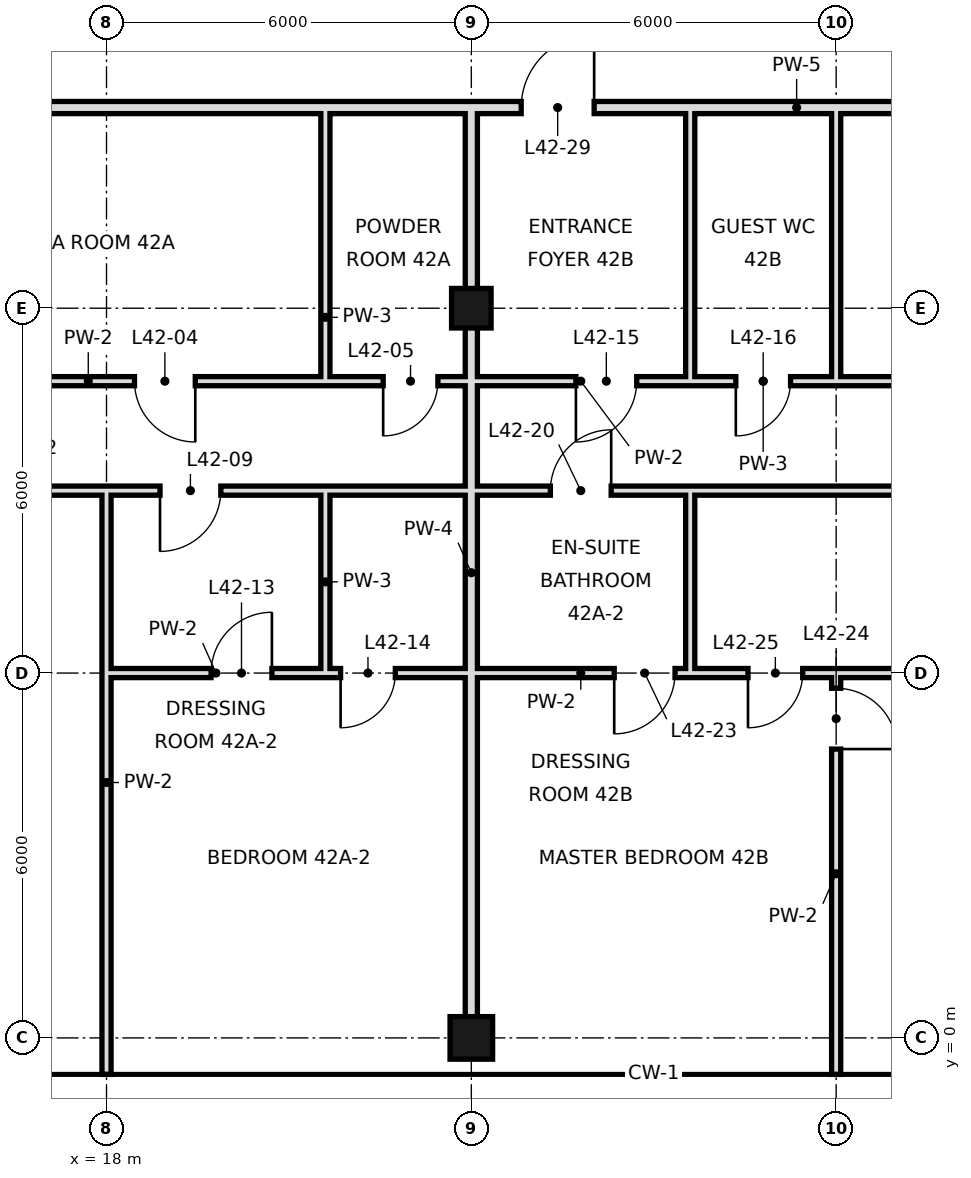
"""IFC4 building model, lengths in metres.
Left out: names, types, materials, properties, quantities, classifications, styles, units other than length and angle.
Written with IfcOpenShell. Run it as: python <this file> out.ifc"""

import sys

from ifc_helpers import new_model, si_unit, direction, frame, frame_2d, origin, origin_2d, place, context, subcontext, project, spatial, rectangle, hollow_rectangle, extrude, element, fill, save


model = new_model("IFC4")
c1 = context("Model", 3, precision=1e-05, world=origin(), true_north=direction((0.0, 1.0)))
c2 = subcontext(c1, "Body", "Model", "MODEL_VIEW")
j1 = project(units=[si_unit("LENGTHUNIT", "METRE"), si_unit("PLANEANGLEUNIT", "RADIAN")], contexts=[c1])
p1 = place(None, origin())
s1 = spatial("IfcSite", under=j1, at=p1, CompositionType="ELEMENT")
p2 = place(p1, origin())
s2 = spatial("IfcBuilding", under=s1, at=p2, CompositionType="ELEMENT")
p3 = place(p2, frame((0.0, 0.0, 181.6)))
s3 = spatial("IfcBuildingStorey", under=s2, at=p3, CompositionType="ELEMENT", Elevation=181.6)
p4 = place(p3, frame((24.0, 0.0, 0.0), z_axis=(0.0, 0.0, 1.0), x_axis=(1.0, 0.0, 0.0)))
e1 = element("IfcColumn", 1, at=p4, inside=s3, PredefinedType="COLUMN", context=c2, shape_type="SweptSolid", body=[
    extrude(hollow_rectangle(XDim=0.7, YDim=0.7, WallThickness=0.036, at=origin_2d()), origin(), (0.0, 0.0, 1.0), 4.4),
])
p5 = place(p3, frame((24.0, 12.0, 0.0), z_axis=(0.0, 0.0, 1.0), x_axis=(1.0, 0.0, 0.0)))
e2 = element("IfcColumn", 2, at=p5, inside=s3, PredefinedType="COLUMN", context=c2, shape_type="SweptSolid", body=[
    extrude(hollow_rectangle(XDim=0.65, YDim=0.65, WallThickness=0.032, at=origin_2d()), origin(), (0.0, 0.0, 1.0), 4.4),
])
p6 = place(p3, frame((18.0, -0.6, 0.0), z_axis=(0.0, 0.0, 1.0), x_axis=(0.0, 1.0, 0.0)))
e3 = element("IfcWall", 3, at=p6, inside=s3, PredefinedType="PARTITIONING", context=c2, shape_type="SweptSolid", body=[
    extrude(rectangle(XDim=9.6, YDim=0.15, at=frame_2d((4.8, 0.0))), origin(), (0.0, 0.0, 1.0), 3.4),
])
p7 = place(p3, frame((21.6, 6.0, 0.0), z_axis=(0.0, 0.0, 1.0), x_axis=(0.0, 1.0, 0.0)))
e4 = element("IfcWall", 4, at=p7, inside=s3, PredefinedType="PARTITIONING", context=c2, shape_type="SweptSolid", body=[
    extrude(rectangle(XDim=3.0, YDim=0.15, at=frame_2d((1.5, 0.0))), origin(), (0.0, 0.0, 1.0), 4.1),
])
p8 = place(p3, frame((21.6, 10.8, 0.0), z_axis=(0.0, 0.0, 1.0), x_axis=(0.0, 1.0, 0.0)))
e5 = element("IfcWall", 5, at=p8, inside=s3, PredefinedType="PARTITIONING", context=c2, shape_type="SweptSolid", body=[
    extrude(rectangle(XDim=4.5, YDim=0.15, at=frame_2d((2.25, 0.0))), origin(), (0.0, 0.0, 1.0), 4.1),
])
p9 = place(p3, frame((24.0, 0.0, 0.0), z_axis=(0.0, 0.0, 1.0), x_axis=(0.0, 1.0, 0.0)))
e6 = element("IfcWall", 6, at=p9, inside=s3, PredefinedType="SOLIDWALL", context=c2, shape_type="SweptSolid", body=[
    extrude(rectangle(XDim=15.3, YDim=0.2, at=frame_2d((7.65, 0.0))), origin(), (0.0, 0.0, 1.0), 3.4),
])
p10 = place(p3, frame((27.6, 6.0, 0.0), z_axis=(0.0, 0.0, 1.0), x_axis=(0.0, 1.0, 0.0)))
e7 = element("IfcWall", 7, at=p10, inside=s3, PredefinedType="PARTITIONING", context=c2, shape_type="SweptSolid", body=[
    extrude(rectangle(XDim=3.0, YDim=0.15, at=frame_2d((1.5, 0.0))), origin(), (0.0, 0.0, 1.0), 4.1),
])
p11 = place(p3, frame((27.6, 10.8, 0.0), z_axis=(0.0, 0.0, 1.0), x_axis=(0.0, 1.0, 0.0)))
e8 = element("IfcWall", 8, at=p11, inside=s3, PredefinedType="PARTITIONING", context=c2, shape_type="SweptSolid", body=[
    extrude(rectangle(XDim=4.5, YDim=0.15, at=frame_2d((2.25, 0.0))), origin(), (0.0, 0.0, 1.0), 4.1),
])
p12 = place(p3, frame((30.0, -0.6, 0.0), z_axis=(0.0, 0.0, 1.0), x_axis=(0.0, 1.0, 0.0)))
e9 = element("IfcWall", 9, at=p12, inside=s3, PredefinedType="PARTITIONING", context=c2, shape_type="SweptSolid", body=[
    extrude(rectangle(XDim=6.6, YDim=0.15, at=frame_2d((3.3, 0.0))), origin(), (0.0, 0.0, 1.0), 3.4),
])
p13 = place(p12, frame((5.35, 0.0, 0.0)))
e10 = element("IfcOpeningElement", 10, at=p13, cuts=e9, PredefinedType="OPENING", context=c2, shape_type="SweptSolid", body=[
    extrude(rectangle(XDim=1.0, YDim=2.4, at=frame_2d((0.5, 1.2))), frame((0.0, 0.085, 0.0), z_axis=(0.0, -1.0, 0.0), x_axis=(1.0, 0.0, 0.0)), (0.0, 0.0, 1.0), 0.17),
])
p14 = place(p3, frame((30.0, 10.8, 0.0), z_axis=(0.0, 0.0, 1.0), x_axis=(0.0, 1.0, 0.0)))
e11 = element("IfcWall", 11, at=p14, inside=s3, PredefinedType="PARTITIONING", context=c2, shape_type="SweptSolid", body=[
    extrude(rectangle(XDim=4.5, YDim=0.15, at=frame_2d((2.25, 0.0))), origin(), (0.0, 0.0, 1.0), 3.4),
])
p15 = place(p3, frame((13.8, 10.8, 0.0), z_axis=(0.0, 0.0, 1.0), x_axis=(1.0, 0.0, 0.0)))
e12 = element("IfcWall", 12, at=p15, inside=s3, PredefinedType="PARTITIONING", context=c2, shape_type="SweptSolid", body=[
    extrude(rectangle(XDim=7.8, YDim=0.15, at=frame_2d((3.9, 0.0))), origin(), (0.0, 0.0, 1.0), 4.1),
])
p16 = place(p15, frame((4.66, 0.0, 0.0)))
e13 = element("IfcOpeningElement", 13, at=p16, cuts=e12, PredefinedType="OPENING", context=c2, shape_type="SweptSolid", body=[
    extrude(rectangle(XDim=1.0, YDim=2.4, at=frame_2d((0.5, 1.2))), frame((0.0, 0.085, 0.0), z_axis=(0.0, -1.0, 0.0), x_axis=(1.0, 0.0, 0.0)), (0.0, 0.0, 1.0), 0.17),
])
p17 = place(p3, frame((24.0, 10.8, 0.0), z_axis=(0.0, 0.0, 1.0), x_axis=(1.0, 0.0, 0.0)))
e14 = element("IfcWall", 14, at=p17, inside=s3, PredefinedType="PARTITIONING", context=c2, shape_type="SweptSolid", body=[
    extrude(rectangle(XDim=3.6, YDim=0.15, at=frame_2d((1.8, 0.0))), origin(), (0.0, 0.0, 1.0), 4.1),
])
p18 = place(p17, frame((1.72, 0.0, 0.0)))
e15 = element("IfcOpeningElement", 15, at=p18, cuts=e14, PredefinedType="OPENING", context=c2, shape_type="SweptSolid", body=[
    extrude(rectangle(XDim=1.0, YDim=2.4, at=frame_2d((0.5, 1.2))), frame((0.0, 0.085, 0.0), z_axis=(0.0, -1.0, 0.0), x_axis=(1.0, 0.0, 0.0)), (0.0, 0.0, 1.0), 0.17),
])
p19 = place(p3, frame((30.0, 10.8, 0.0), z_axis=(0.0, 0.0, 1.0), x_axis=(1.0, 0.0, 0.0)))
e16 = element("IfcWall", 16, at=p19, inside=s3, PredefinedType="PARTITIONING", context=c2, shape_type="SweptSolid", body=[
    extrude(rectangle(XDim=24.0, YDim=0.15, at=frame_2d((12.0, 0.0))), origin(), (0.0, 0.0, 1.0), 4.1),
])
p20 = place(p19, frame((3.4, 0.0, 0.0)))
e17 = element("IfcOpeningElement", 17, at=p20, cuts=e16, PredefinedType="OPENING", context=c2, shape_type="SweptSolid", body=[
    extrude(rectangle(XDim=1.0, YDim=2.4, at=frame_2d((0.5, 1.2))), frame((0.0, 0.085, 0.0), z_axis=(0.0, -1.0, 0.0), x_axis=(1.0, 0.0, 0.0)), (0.0, 0.0, 1.0), 0.17),
])
p21 = place(p19, frame((15.4, 0.0, 0.0)))
e18 = element("IfcOpeningElement", 18, at=p21, cuts=e16, PredefinedType="OPENING", context=c2, shape_type="SweptSolid", body=[
    extrude(rectangle(XDim=1.0, YDim=2.4, at=frame_2d((0.5, 1.2))), frame((0.0, 0.085, 0.0), z_axis=(0.0, -1.0, 0.0), x_axis=(1.0, 0.0, 0.0)), (0.0, 0.0, 1.0), 0.17),
])
p22 = place(p3, frame((21.6, 10.8, 0.0), z_axis=(0.0, 0.0, 1.0), x_axis=(1.0, 0.0, 0.0)))
e19 = element("IfcWall", 19, at=p22, inside=s3, PredefinedType="PARTITIONING", context=c2, shape_type="SweptSolid", body=[
    extrude(rectangle(XDim=2.4, YDim=0.15, at=frame_2d((1.2, 0.0))), origin(), (0.0, 0.0, 1.0), 4.1),
])
p23 = place(p22, frame((0.95, 0.0, 0.0)))
e20 = element("IfcOpeningElement", 20, at=p23, cuts=e19, PredefinedType="OPENING", context=c2, shape_type="SweptSolid", body=[
    extrude(rectangle(XDim=0.9, YDim=2.4, at=frame_2d((0.45, 1.2))), frame((0.0, 0.085, 0.0), z_axis=(0.0, -1.0, 0.0), x_axis=(1.0, 0.0, 0.0)), (0.0, 0.0, 1.0), 0.17),
])
p24 = place(p3, frame((27.6, 10.8, 0.0), z_axis=(0.0, 0.0, 1.0), x_axis=(1.0, 0.0, 0.0)))
e21 = element("IfcWall", 21, at=p24, inside=s3, PredefinedType="PARTITIONING", context=c2, shape_type="SweptSolid", body=[
    extrude(rectangle(XDim=2.4, YDim=0.15, at=frame_2d((1.2, 0.0))), origin(), (0.0, 0.0, 1.0), 4.1),
])
p25 = place(p24, frame((0.75, 0.0, 0.0)))
e22 = element("IfcOpeningElement", 22, at=p25, cuts=e21, PredefinedType="OPENING", context=c2, shape_type="SweptSolid", body=[
    extrude(rectangle(XDim=0.9, YDim=2.4, at=frame_2d((0.45, 1.2))), frame((0.0, 0.085, 0.0), z_axis=(0.0, -1.0, 0.0), x_axis=(1.0, 0.0, 0.0)), (0.0, 0.0, 1.0), 0.17),
])
p26 = place(p3, frame((13.8, 15.3, 0.0), z_axis=(0.0, 0.0, 1.0), x_axis=(1.0, 0.0, 0.0)))
e23 = element("IfcWall", 23, at=p26, inside=s3, PredefinedType="SOLIDWALL", context=c2, shape_type="SweptSolid", body=[
    extrude(rectangle(XDim=31.1, YDim=0.2, at=frame_2d((15.55, 0.0))), origin(), (0.0, 0.0, 1.0), 3.4),
])
p27 = place(p26, frame((11.02, 0.0, 0.0)))
e24 = element("IfcOpeningElement", 24, at=p27, cuts=e23, PredefinedType="OPENING", context=c2, shape_type="SweptSolid", body=[
    extrude(rectangle(XDim=1.2, YDim=2.4, at=frame_2d((0.6, 1.2))), frame((0.0, 0.11, 0.0), z_axis=(0.0, -1.0, 0.0), x_axis=(1.0, 0.0, 0.0)), (0.0, 0.0, 1.0), 0.22),
])
p28 = place(p3, frame((18.0, 6.0, 0.0), z_axis=(0.0, 0.0, 1.0), x_axis=(1.0, 0.0, 0.0)))
e25 = element("IfcWall", 25, at=p28, inside=s3, PredefinedType="PARTITIONING", context=c2, shape_type="SweptSolid", body=[
    extrude(rectangle(XDim=3.6, YDim=0.15, at=frame_2d((1.8, 0.0))), origin(), (0.0, 0.0, 1.0), 3.65),
])
p29 = place(p28, frame((1.72, 0.0, 0.0)))
e26 = element("IfcOpeningElement", 26, at=p29, cuts=e25, PredefinedType="OPENING", context=c2, shape_type="SweptSolid", body=[
    extrude(rectangle(XDim=1.0, YDim=2.4, at=frame_2d((0.5, 1.2))), frame((0.0, 0.085, 0.0), z_axis=(0.0, -1.0, 0.0), x_axis=(1.0, 0.0, 0.0)), (0.0, 0.0, 1.0), 0.17),
])
p30 = place(p3, frame((24.0, 6.0, 0.0), z_axis=(0.0, 0.0, 1.0), x_axis=(1.0, 0.0, 0.0)))
e27 = element("IfcWall", 27, at=p30, inside=s3, PredefinedType="PARTITIONING", context=c2, shape_type="SweptSolid", body=[
    extrude(rectangle(XDim=3.6, YDim=0.15, at=frame_2d((1.8, 0.0))), origin(), (0.0, 0.0, 1.0), 3.65),
])
p31 = place(p30, frame((2.35, 0.0, 0.0)))
e28 = element("IfcOpeningElement", 28, at=p31, cuts=e27, PredefinedType="OPENING", context=c2, shape_type="SweptSolid", body=[
    extrude(rectangle(XDim=1.0, YDim=2.4, at=frame_2d((0.5, 1.2))), frame((0.0, 0.085, 0.0), z_axis=(0.0, -1.0, 0.0), x_axis=(1.0, 0.0, 0.0)), (0.0, 0.0, 1.0), 0.17),
])
p32 = place(p3, frame((21.6, 6.0, 0.0), z_axis=(0.0, 0.0, 1.0), x_axis=(1.0, 0.0, 0.0)))
e29 = element("IfcWall", 29, at=p32, inside=s3, PredefinedType="PARTITIONING", context=c2, shape_type="SweptSolid", body=[
    extrude(rectangle(XDim=2.4, YDim=0.15, at=frame_2d((1.2, 0.0))), origin(), (0.0, 0.0, 1.0), 3.65),
])
p33 = place(p32, frame((0.25, 0.0, 0.0)))
e30 = element("IfcOpeningElement", 30, at=p33, cuts=e29, PredefinedType="OPENING", context=c2, shape_type="SweptSolid", body=[
    extrude(rectangle(XDim=0.9, YDim=2.4, at=frame_2d((0.45, 1.2))), frame((0.0, 0.085, 0.0), z_axis=(0.0, -1.0, 0.0), x_axis=(1.0, 0.0, 0.0)), (0.0, 0.0, 1.0), 0.17),
])
p34 = place(p3, frame((27.6, 6.0, 0.0), z_axis=(0.0, 0.0, 1.0), x_axis=(1.0, 0.0, 0.0)))
e31 = element("IfcWall", 31, at=p34, inside=s3, PredefinedType="PARTITIONING", context=c2, shape_type="SweptSolid", body=[
    extrude(rectangle(XDim=8.4, YDim=0.15, at=frame_2d((4.2, 0.0))), origin(), (0.0, 0.0, 1.0), 3.65),
])
p35 = place(p34, frame((0.95, 0.0, 0.0)))
e32 = element("IfcOpeningElement", 32, at=p35, cuts=e31, PredefinedType="OPENING", context=c2, shape_type="SweptSolid", body=[
    extrude(rectangle(XDim=0.9, YDim=2.4, at=frame_2d((0.45, 1.2))), frame((0.0, 0.085, 0.0), z_axis=(0.0, -1.0, 0.0), x_axis=(1.0, 0.0, 0.0)), (0.0, 0.0, 1.0), 0.17),
])
p36 = place(p3, frame((12.0, 9.0, 0.0), z_axis=(0.0, 0.0, 1.0), x_axis=(1.0, 0.0, 0.0)))
e33 = element("IfcWall", 33, at=p36, inside=s3, PredefinedType="PARTITIONING", context=c2, shape_type="SweptSolid", body=[
    extrude(rectangle(XDim=9.6, YDim=0.15, at=frame_2d((4.8, 0.0))), origin(), (0.0, 0.0, 1.0), 4.1),
])
p37 = place(p36, frame((2.1, 0.0, 0.0)))
e34 = element("IfcOpeningElement", 34, at=p37, cuts=e33, PredefinedType="OPENING", context=c2, shape_type="SweptSolid", body=[
    extrude(rectangle(XDim=1.8, YDim=2.4, at=frame_2d((0.9, 1.2))), frame((0.0, 0.085, 0.0), z_axis=(0.0, -1.0, 0.0), x_axis=(1.0, 0.0, 0.0)), (0.0, 0.0, 1.0), 0.17),
])
p38 = place(p36, frame((6.88, 0.0, 0.0)))
e35 = element("IfcOpeningElement", 35, at=p38, cuts=e33, PredefinedType="OPENING", context=c2, shape_type="SweptSolid", body=[
    extrude(rectangle(XDim=1.0, YDim=2.4, at=frame_2d((0.5, 1.2))), frame((0.0, 0.085, 0.0), z_axis=(0.0, -1.0, 0.0), x_axis=(1.0, 0.0, 0.0)), (0.0, 0.0, 1.0), 0.17),
])
p39 = place(p3, frame((24.0, 9.0, 0.0), z_axis=(0.0, 0.0, 1.0), x_axis=(1.0, 0.0, 0.0)))
e36 = element("IfcWall", 36, at=p39, inside=s3, PredefinedType="PARTITIONING", context=c2, shape_type="SweptSolid", body=[
    extrude(rectangle(XDim=3.6, YDim=0.15, at=frame_2d((1.8, 0.0))), origin(), (0.0, 0.0, 1.0), 4.1),
])
p40 = place(p39, frame((1.3, 0.0, 0.0)))
e37 = element("IfcOpeningElement", 37, at=p40, cuts=e36, PredefinedType="OPENING", context=c2, shape_type="SweptSolid", body=[
    extrude(rectangle(XDim=1.0, YDim=2.4, at=frame_2d((0.5, 1.2))), frame((0.0, 0.085, 0.0), z_axis=(0.0, -1.0, 0.0), x_axis=(1.0, 0.0, 0.0)), (0.0, 0.0, 1.0), 0.17),
])
p41 = place(p3, frame((21.6, 9.0, 0.0), z_axis=(0.0, 0.0, 1.0), x_axis=(1.0, 0.0, 0.0)))
e38 = element("IfcWall", 38, at=p41, inside=s3, PredefinedType="PARTITIONING", context=c2, shape_type="SweptSolid", body=[
    extrude(rectangle(XDim=2.4, YDim=0.15, at=frame_2d((1.2, 0.0))), origin(), (0.0, 0.0, 1.0), 4.1),
])
p42 = place(p3, frame((27.6, 9.0, 0.0), z_axis=(0.0, 0.0, 1.0), x_axis=(1.0, 0.0, 0.0)))
e39 = element("IfcWall", 39, at=p42, inside=s3, PredefinedType="PARTITIONING", context=c2, shape_type="SweptSolid", body=[
    extrude(rectangle(XDim=8.4, YDim=0.15, at=frame_2d((4.2, 0.0))), origin(), (0.0, 0.0, 1.0), 4.1),
])
p43 = place(p16, origin())
e40 = element("IfcDoor", 40, at=p43, inside=s3, OperationType="SINGLE_SWING_RIGHT", PredefinedType="DOOR", context=c2, shape_type="SweptSolid", body=[
    extrude(rectangle(XDim=1.0, YDim=2.4, at=frame_2d((0.5, 1.2))), frame((0.0, 0.025, 0.0), z_axis=(0.0, -1.0, 0.0), x_axis=(1.0, 0.0, 0.0)), (0.0, 0.0, 1.0), 0.05),
])
fill(e13, e40)
p44 = place(p23, frame((0.9, 0.0, 0.0), z_axis=(0.0, 0.0, 1.0), x_axis=(-1.0, 0.0, 0.0)))
e41 = element("IfcDoor", 41, at=p44, inside=s3, OperationType="SINGLE_SWING_RIGHT", PredefinedType="DOOR", context=c2, shape_type="SweptSolid", body=[
    extrude(rectangle(XDim=0.9, YDim=2.4, at=frame_2d((0.45, 1.2))), frame((0.0, 0.025, 0.0), z_axis=(0.0, -1.0, 0.0), x_axis=(1.0, 0.0, 0.0)), (0.0, 0.0, 1.0), 0.05),
])
fill(e20, e41)
p45 = place(p38, frame((1.0, 0.0, 0.0), z_axis=(0.0, 0.0, 1.0), x_axis=(-1.0, 0.0, 0.0)))
e42 = element("IfcDoor", 42, at=p45, inside=s3, OperationType="SINGLE_SWING_RIGHT", PredefinedType="DOOR", context=c2, shape_type="SweptSolid", body=[
    extrude(rectangle(XDim=1.0, YDim=2.4, at=frame_2d((0.5, 1.2))), frame((0.0, 0.025, 0.0), z_axis=(0.0, -1.0, 0.0), x_axis=(1.0, 0.0, 0.0)), (0.0, 0.0, 1.0), 0.05),
])
fill(e35, e42)
p46 = place(p29, frame((1.0, 0.0, 0.0), z_axis=(0.0, 0.0, 1.0), x_axis=(-1.0, 0.0, 0.0)))
e43 = element("IfcDoor", 43, at=p46, inside=s3, OperationType="SINGLE_SWING_LEFT", PredefinedType="DOOR", context=c2, shape_type="SweptSolid", body=[
    extrude(rectangle(XDim=1.0, YDim=2.4, at=frame_2d((0.5, 1.2))), frame((0.0, 0.025, 0.0), z_axis=(0.0, -1.0, 0.0), x_axis=(1.0, 0.0, 0.0)), (0.0, 0.0, 1.0), 0.05),
])
fill(e26, e43)
p47 = place(p33, frame((0.9, 0.0, 0.0), z_axis=(0.0, 0.0, 1.0), x_axis=(-1.0, 0.0, 0.0)))
e44 = element("IfcDoor", 44, at=p47, inside=s3, OperationType="SINGLE_SWING_RIGHT", PredefinedType="DOOR", context=c2, shape_type="SweptSolid", body=[
    extrude(rectangle(XDim=0.9, YDim=2.4, at=frame_2d((0.45, 1.2))), frame((0.0, 0.025, 0.0), z_axis=(0.0, -1.0, 0.0), x_axis=(1.0, 0.0, 0.0)), (0.0, 0.0, 1.0), 0.05),
])
fill(e30, e44)
p48 = place(p18, frame((1.0, 0.0, 0.0), z_axis=(0.0, 0.0, 1.0), x_axis=(-1.0, 0.0, 0.0)))
e45 = element("IfcDoor", 45, at=p48, inside=s3, OperationType="SINGLE_SWING_RIGHT", PredefinedType="DOOR", context=c2, shape_type="SweptSolid", body=[
    extrude(rectangle(XDim=1.0, YDim=2.4, at=frame_2d((0.5, 1.2))), frame((0.0, 0.025, 0.0), z_axis=(0.0, -1.0, 0.0), x_axis=(1.0, 0.0, 0.0)), (0.0, 0.0, 1.0), 0.05),
])
fill(e15, e45)
p49 = place(p25, frame((0.9, 0.0, 0.0), z_axis=(0.0, 0.0, 1.0), x_axis=(-1.0, 0.0, 0.0)))
e46 = element("IfcDoor", 46, at=p49, inside=s3, OperationType="SINGLE_SWING_RIGHT", PredefinedType="DOOR", context=c2, shape_type="SweptSolid", body=[
    extrude(rectangle(XDim=0.9, YDim=2.4, at=frame_2d((0.45, 1.2))), frame((0.0, 0.025, 0.0), z_axis=(0.0, -1.0, 0.0), x_axis=(1.0, 0.0, 0.0)), (0.0, 0.0, 1.0), 0.05),
])
fill(e22, e46)
p50 = place(p40, frame((1.0, 0.0, 0.0), z_axis=(0.0, 0.0, 1.0), x_axis=(-1.0, 0.0, 0.0)))
e47 = element("IfcDoor", 47, at=p50, inside=s3, OperationType="SINGLE_SWING_LEFT", PredefinedType="DOOR", context=c2, shape_type="SweptSolid", body=[
    extrude(rectangle(XDim=1.0, YDim=2.4, at=frame_2d((0.5, 1.2))), frame((0.0, 0.025, 0.0), z_axis=(0.0, -1.0, 0.0), x_axis=(1.0, 0.0, 0.0)), (0.0, 0.0, 1.0), 0.05),
])
fill(e37, e47)
p51 = place(p31, frame((1.0, 0.0, 0.0), z_axis=(0.0, 0.0, 1.0), x_axis=(-1.0, 0.0, 0.0)))
e48 = element("IfcDoor", 48, at=p51, inside=s3, OperationType="SINGLE_SWING_RIGHT", PredefinedType="DOOR", context=c2, shape_type="SweptSolid", body=[
    extrude(rectangle(XDim=1.0, YDim=2.4, at=frame_2d((0.5, 1.2))), frame((0.0, 0.025, 0.0), z_axis=(0.0, -1.0, 0.0), x_axis=(1.0, 0.0, 0.0)), (0.0, 0.0, 1.0), 0.05),
])
fill(e28, e48)
p52 = place(p13, frame((1.0, 0.0, 0.0), z_axis=(0.0, 0.0, 1.0), x_axis=(-1.0, 0.0, 0.0)))
e49 = element("IfcDoor", 49, at=p52, inside=s3, OperationType="SINGLE_SWING_RIGHT", PredefinedType="DOOR", context=c2, shape_type="SweptSolid", body=[
    extrude(rectangle(XDim=1.0, YDim=2.4, at=frame_2d((0.5, 1.2))), frame((0.0, 0.025, 0.0), z_axis=(0.0, -1.0, 0.0), x_axis=(1.0, 0.0, 0.0)), (0.0, 0.0, 1.0), 0.05),
])
fill(e10, e49)
p53 = place(p35, frame((0.9, 0.0, 0.0), z_axis=(0.0, 0.0, 1.0), x_axis=(-1.0, 0.0, 0.0)))
e50 = element("IfcDoor", 50, at=p53, inside=s3, OperationType="SINGLE_SWING_RIGHT", PredefinedType="DOOR", context=c2, shape_type="SweptSolid", body=[
    extrude(rectangle(XDim=0.9, YDim=2.4, at=frame_2d((0.45, 1.2))), frame((0.0, 0.025, 0.0), z_axis=(0.0, -1.0, 0.0), x_axis=(1.0, 0.0, 0.0)), (0.0, 0.0, 1.0), 0.05),
])
fill(e32, e50)
p54 = place(p27, frame((1.2, 0.0, 0.0), z_axis=(0.0, 0.0, 1.0), x_axis=(-1.0, 0.0, 0.0)))
e51 = element("IfcDoor", 51, at=p54, inside=s3, OperationType="SINGLE_SWING_LEFT", PredefinedType="DOOR", context=c2, shape_type="SweptSolid", body=[
    extrude(rectangle(XDim=1.2, YDim=2.4, at=frame_2d((0.6, 1.2))), frame((0.0, 0.025, 0.0), z_axis=(0.0, -1.0, 0.0), x_axis=(1.0, 0.0, 0.0)), (0.0, 0.0, 1.0), 0.05),
])
fill(e24, e51)
save(model, sys.argv[1])
